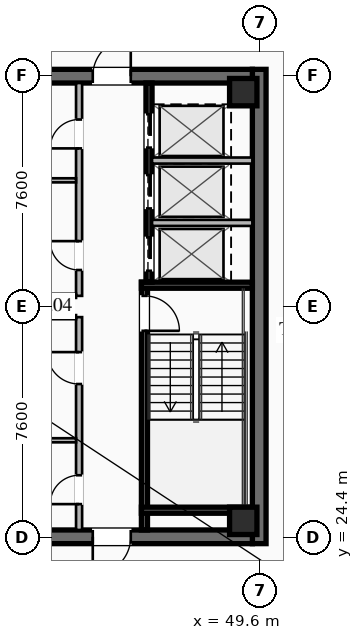
"""IFC4 building model, lengths in metres.
Left out: names, types, materials, properties, quantities, classifications, styles, units other than length and angle.
Written with IfcOpenShell. Run it as: python <this file> out.ifc"""

import sys

from ifc_helpers import new_model, si_unit, direction, frame, frame_2d, origin, origin_2d, place, context, subcontext, project, spatial, rectangle, hollow_rectangle, extrude, element, fill, save


model = new_model("IFC4")
c1 = context("Model", 3, precision=1e-05, world=origin(), true_north=direction((0.0, 1.0)))
c2 = subcontext(c1, "Body", "Model", "MODEL_VIEW")
j1 = project(units=[si_unit("LENGTHUNIT", "METRE"), si_unit("PLANEANGLEUNIT", "RADIAN")], contexts=[c1])
p1 = place(None, origin())
s1 = spatial("IfcSite", under=j1, at=p1, CompositionType="ELEMENT")
p2 = place(p1, origin())
s2 = spatial("IfcBuilding", under=s1, at=p2, CompositionType="ELEMENT")
p3 = place(p2, frame((0.0, 0.0, 255.4)))
s3 = spatial("IfcBuildingStorey", under=s2, at=p3, CompositionType="ELEMENT", Elevation=255.4)
p4 = place(p3, frame((49.575, 39.8, 0.0), z_axis=(0.0, 0.0, 1.0), x_axis=(0.0, -1.0, 0.0)))
e1 = element("IfcWall", 1, at=p4, inside=s3, PredefinedType="SHEAR", context=c2, shape_type="SweptSolid", body=[
    extrude(rectangle(XDim=15.6, YDim=0.45, at=frame_2d((7.8, 0.0))), origin(), (0.0, 0.0, 1.0), 4.0),
])
p5 = place(p3, frame((49.35, 24.425, 0.0), z_axis=(0.0, 0.0, 1.0), x_axis=(-1.0, 0.0, 0.0)))
e2 = element("IfcWall", 2, at=p5, inside=s3, PredefinedType="SHEAR", context=c2, shape_type="SweptSolid", body=[
    extrude(rectangle(XDim=14.7, YDim=0.45, at=frame_2d((7.35, 0.0))), origin(), (0.0, 0.0, 1.0), 4.0),
])
p6 = place(p5, frame((9.05, 0.0, 0.0)))
e3 = element("IfcOpeningElement", 3, at=p6, cuts=e2, PredefinedType="OPENING", context=c2, shape_type="SweptSolid", body=[
    extrude(rectangle(XDim=1.25, YDim=2.25, at=frame_2d((0.625, 1.125))), frame((0.0, 0.235, 0.0), z_axis=(0.0, -1.0, 0.0), x_axis=(1.0, 0.0, 0.0)), (0.0, 0.0, 1.0), 0.47),
])
p7 = place(p5, frame((4.0, 0.0, 0.0)))
e4 = element("IfcOpeningElement", 4, at=p7, cuts=e2, PredefinedType="OPENING", context=c2, shape_type="SweptSolid", body=[
    extrude(rectangle(XDim=1.25, YDim=2.25, at=frame_2d((0.625, 1.125))), frame((0.0, 0.235, 0.0), z_axis=(0.0, -1.0, 0.0), x_axis=(1.0, 0.0, 0.0)), (0.0, 0.0, 1.0), 0.47),
])
p8 = place(p3, frame((34.65, 39.575, 0.0), z_axis=(0.0, 0.0, 1.0), x_axis=(1.0, 0.0, 0.0)))
e5 = element("IfcWall", 5, at=p8, inside=s3, PredefinedType="SHEAR", context=c2, shape_type="SweptSolid", body=[
    extrude(rectangle(XDim=14.7, YDim=0.45, at=frame_2d((7.35, 0.0))), origin(), (0.0, 0.0, 1.0), 4.0),
])
p9 = place(p8, frame((4.4, 0.0, 0.0)))
e6 = element("IfcOpeningElement", 6, at=p9, cuts=e5, PredefinedType="OPENING", context=c2, shape_type="SweptSolid", body=[
    extrude(rectangle(XDim=1.25, YDim=2.25, at=frame_2d((0.625, 1.125))), frame((0.0, 0.235, 0.0), z_axis=(0.0, -1.0, 0.0), x_axis=(1.0, 0.0, 0.0)), (0.0, 0.0, 1.0), 0.47),
])
p10 = place(p8, frame((9.45, 0.0, 0.0)))
e7 = element("IfcOpeningElement", 7, at=p10, cuts=e5, PredefinedType="OPENING", context=c2, shape_type="SweptSolid", body=[
    extrude(rectangle(XDim=1.25, YDim=2.25, at=frame_2d((0.625, 1.125))), frame((0.0, 0.235, 0.0), z_axis=(0.0, -1.0, 0.0), x_axis=(1.0, 0.0, 0.0)), (0.0, 0.0, 1.0), 0.47),
])
for number, where, z_axis, x_axis in (
    (8, (49.05, 24.95, 0.0), (0.0, 0.0, 1.0), (1.0, 0.0, 0.0)),
    (9, (49.05, 39.05, 0.0), (0.0, 0.0, 1.0), (1.0, 0.0, 0.0)),
):
    element("IfcColumn", number, at=place(p3, frame(where, z_axis=z_axis, x_axis=x_axis)), inside=s3, PredefinedType="COLUMN", context=c2, shape_type="SweptSolid", body=[
        extrude(hollow_rectangle(XDim=0.9, YDim=0.9, WallThickness=0.04, at=origin_2d()), origin(), (0.0, 0.0, 1.0), 3.78),
    ])
p11 = place(p3, frame((45.8, 32.8, 0.0), z_axis=(0.0, 0.0, 1.0), x_axis=(0.0, -1.0, 0.0)))
e10 = element("IfcWall", 10, at=p11, inside=s3, PredefinedType="SHEAR", context=c2, shape_type="SweptSolid", body=[
    extrude(rectangle(XDim=8.15, YDim=0.2, at=frame_2d((4.075, 0.0))), origin(), (0.0, 0.0, 1.0), 3.78),
])
p12 = place(p11, frame((0.45, 0.0, 0.0)))
e11 = element("IfcOpeningElement", 11, at=p12, cuts=e10, PredefinedType="OPENING", context=c2, shape_type="SweptSolid", body=[
    extrude(rectangle(XDim=1.15, YDim=2.2, at=frame_2d((0.575, 1.1))), frame((0.0, 0.11, 0.0), z_axis=(0.0, -1.0, 0.0), x_axis=(1.0, 0.0, 0.0)), (0.0, 0.0, 1.0), 0.22),
])
for number, where, z_axis, x_axis in (
    (12, (45.7, 32.7, 0.0), (0.0, 0.0, 1.0), (1.0, 0.0, 0.0)),
    (13, (45.7, 25.3, 0.0), (0.0, 0.0, 1.0), (1.0, 0.0, 0.0)),
):
    element("IfcWall", number, at=place(p3, frame(where, z_axis=z_axis, x_axis=x_axis)), inside=s3, PredefinedType="SHEAR", context=c2, shape_type="SweptSolid", body=[
        extrude(rectangle(XDim=3.65, YDim=0.2, at=frame_2d((1.825, 0.0))), origin(), (0.0, 0.0, 1.0), 3.78),
    ])
p13 = place(p3, frame((45.95, 39.35, 0.0), z_axis=(0.0, 0.0, 1.0), x_axis=(0.0, -1.0, 0.0)))
e14 = element("IfcWall", 14, at=p13, inside=s3, PredefinedType="SHEAR", context=c2, shape_type="SweptSolid", body=[
    extrude(rectangle(XDim=6.55, YDim=0.2, at=frame_2d((3.275, 0.0))), origin(), (0.0, 0.0, 1.0), 3.78),
])
p14 = place(p13, frame((5.075, 0.0, 0.0)))
e15 = element("IfcOpeningElement", 15, at=p14, cuts=e14, PredefinedType="OPENING", context=c2, shape_type="SweptSolid", body=[
    extrude(rectangle(XDim=1.1, YDim=2.2, at=frame_2d((0.55, 1.1))), frame((0.0, 0.11, 0.0), z_axis=(0.0, -1.0, 0.0), x_axis=(1.0, 0.0, 0.0)), (0.0, 0.0, 1.0), 0.22),
])
p15 = place(p13, frame((3.025, 0.0, 0.0)))
e16 = element("IfcOpeningElement", 16, at=p15, cuts=e14, PredefinedType="OPENING", context=c2, shape_type="SweptSolid", body=[
    extrude(rectangle(XDim=1.1, YDim=2.2, at=frame_2d((0.55, 1.1))), frame((0.0, 0.11, 0.0), z_axis=(0.0, -1.0, 0.0), x_axis=(1.0, 0.0, 0.0)), (0.0, 0.0, 1.0), 0.22),
])
p16 = place(p13, frame((1.025, 0.0, 0.0)))
e17 = element("IfcOpeningElement", 17, at=p16, cuts=e14, PredefinedType="OPENING", context=c2, shape_type="SweptSolid", body=[
    extrude(rectangle(XDim=1.1, YDim=2.2, at=frame_2d((0.55, 1.1))), frame((0.0, 0.11, 0.0), z_axis=(0.0, -1.0, 0.0), x_axis=(1.0, 0.0, 0.0)), (0.0, 0.0, 1.0), 0.22),
])
for number, where, z_axis, x_axis in (
    (18, (46.05, 34.75, 0.0), (0.0, 0.0, 1.0), (1.0, 0.0, 0.0)),
    (19, (46.05, 36.8, 0.0), (0.0, 0.0, 1.0), (1.0, 0.0, 0.0)),
):
    element("IfcWall", number, at=place(p3, frame(where, z_axis=z_axis, x_axis=x_axis)), inside=s3, PredefinedType="SOLIDWALL", context=c2, shape_type="SweptSolid", body=[
        extrude(rectangle(XDim=3.3, YDim=0.2, at=frame_2d((1.65, 0.0))), origin(), (0.0, 0.0, 1.0), 3.78),
    ])
p17 = place(p3, frame((43.65, 24.65, 0.0), z_axis=(0.0, 0.0, 1.0), x_axis=(0.0, 1.0, 0.0)))
e20 = element("IfcWall", 20, at=p17, inside=s3, PredefinedType="SOLIDWALL", context=c2, shape_type="SweptSolid", body=[
    extrude(rectangle(XDim=7.0, YDim=0.2, at=frame_2d((3.5, 0.0))), origin(), (0.0, 0.0, 1.0), 2.971),
])
p18 = place(p17, frame((0.85, 0.0, 0.0)))
e21 = element("IfcOpeningElement", 21, at=p18, cuts=e20, PredefinedType="OPENING", context=c2, shape_type="SweptSolid", body=[
    extrude(rectangle(XDim=0.95, YDim=2.05, at=frame_2d((0.475, 1.025))), frame((0.0, 0.11, 0.0), z_axis=(0.0, -1.0, 0.0), x_axis=(1.0, 0.0, 0.0)), (0.0, 0.0, 1.0), 0.22),
])
p19 = place(p17, frame((4.8, 0.0, 0.0)))
e22 = element("IfcOpeningElement", 22, at=p19, cuts=e20, PredefinedType="OPENING", context=c2, shape_type="SweptSolid", body=[
    extrude(rectangle(XDim=1.05, YDim=2.2, at=frame_2d((0.525, 1.1))), frame((0.0, 0.11, 0.0), z_axis=(0.0, -1.0, 0.0), x_axis=(1.0, 0.0, 0.0)), (0.0, 0.0, 1.0), 0.22),
])
for number, where, z_axis, x_axis in (
    (23, (41.67, 31.65, 0.0), (0.0, 0.0, 1.0), (1.0, 0.0, 0.0)),
    (24, (41.67, 27.6, 0.0), (0.0, 0.0, 1.0), (1.0, 0.0, 0.0)),
):
    element("IfcWall", number, at=place(p3, frame(where, z_axis=z_axis, x_axis=x_axis)), inside=s3, PredefinedType="PARTITIONING", context=c2, shape_type="SweptSolid", body=[
        extrude(rectangle(XDim=1.88, YDim=0.135, at=frame_2d((0.94, 0.0))), origin(), (0.0, 0.0, 1.0), 2.971),
    ])
p20 = place(p3, frame((43.65, 32.35, 0.0), z_axis=(0.0, 0.0, 1.0), x_axis=(0.0, 1.0, 0.0)))
e25 = element("IfcWall", 25, at=p20, inside=s3, PredefinedType="SOLIDWALL", context=c2, shape_type="SweptSolid", body=[
    extrude(rectangle(XDim=7.0, YDim=0.2, at=frame_2d((3.5, 0.0))), origin(), (0.0, 0.0, 1.0), 2.971),
])
p21 = place(p20, frame((0.85, 0.0, 0.0)))
e26 = element("IfcOpeningElement", 26, at=p21, cuts=e25, PredefinedType="OPENING", context=c2, shape_type="SweptSolid", body=[
    extrude(rectangle(XDim=0.95, YDim=2.05, at=frame_2d((0.475, 1.025))), frame((0.0, 0.11, 0.0), z_axis=(0.0, -1.0, 0.0), x_axis=(1.0, 0.0, 0.0)), (0.0, 0.0, 1.0), 0.22),
])
p22 = place(p20, frame((4.85, 0.0, 0.0)))
e27 = element("IfcOpeningElement", 27, at=p22, cuts=e25, PredefinedType="OPENING", context=c2, shape_type="SweptSolid", body=[
    extrude(rectangle(XDim=0.95, YDim=2.05, at=frame_2d((0.475, 1.025))), frame((0.0, 0.11, 0.0), z_axis=(0.0, -1.0, 0.0), x_axis=(1.0, 0.0, 0.0)), (0.0, 0.0, 1.0), 0.22),
])
for number, where, z_axis, x_axis in (
    (28, (41.67, 32.35, 0.0), (0.0, 0.0, 1.0), (1.0, 0.0, 0.0)),
    (29, (41.67, 36.15, 0.0), (0.0, 0.0, 1.0), (1.0, 0.0, 0.0)),
):
    element("IfcWall", number, at=place(p3, frame(where, z_axis=z_axis, x_axis=x_axis)), inside=s3, PredefinedType="PARTITIONING", context=c2, shape_type="SweptSolid", body=[
        extrude(rectangle(XDim=1.88, YDim=0.135, at=frame_2d((0.94, 0.0))), origin(), (0.0, 0.0, 1.0), 2.971),
    ])
p23 = place(p10, origin())
e30 = element("IfcDoor", 30, at=p23, inside=s3, OperationType="SINGLE_SWING_RIGHT", PredefinedType="DOOR", context=c2, shape_type="SweptSolid", body=[
    extrude(rectangle(XDim=1.25, YDim=2.25, at=frame_2d((0.625, 1.125))), frame((0.0, 0.025, 0.0), z_axis=(0.0, -1.0, 0.0), x_axis=(1.0, 0.0, 0.0)), (0.0, 0.0, 1.0), 0.05),
])
fill(e7, e30)
p24 = place(p7, origin())
e31 = element("IfcDoor", 31, at=p24, inside=s3, OperationType="SINGLE_SWING_RIGHT", PredefinedType="DOOR", context=c2, shape_type="SweptSolid", body=[
    extrude(rectangle(XDim=1.25, YDim=2.25, at=frame_2d((0.625, 1.125))), frame((0.0, 0.025, 0.0), z_axis=(0.0, -1.0, 0.0), x_axis=(1.0, 0.0, 0.0)), (0.0, 0.0, 1.0), 0.05),
])
fill(e4, e31)
p25 = place(p12, origin())
e32 = element("IfcDoor", 32, at=p25, inside=s3, OperationType="SINGLE_SWING_RIGHT", PredefinedType="DOOR", context=c2, shape_type="SweptSolid", body=[
    extrude(rectangle(XDim=1.15, YDim=2.2, at=frame_2d((0.575, 1.1))), frame((0.0, 0.025, 0.0), z_axis=(0.0, -1.0, 0.0), x_axis=(1.0, 0.0, 0.0)), (0.0, 0.0, 1.0), 0.05),
])
fill(e11, e32)
p26 = place(p18, origin())
e33 = element("IfcDoor", 33, at=p26, inside=s3, OperationType="SINGLE_SWING_LEFT", PredefinedType="DOOR", context=c2, shape_type="SweptSolid", body=[
    extrude(rectangle(XDim=0.95, YDim=2.05, at=frame_2d((0.475, 1.025))), frame((0.0, 0.025, 0.0), z_axis=(0.0, -1.0, 0.0), x_axis=(1.0, 0.0, 0.0)), (0.0, 0.0, 1.0), 0.05),
])
fill(e21, e33)
p27 = place(p19, origin())
e34 = element("IfcDoor", 34, at=p27, inside=s3, OperationType="SINGLE_SWING_RIGHT", PredefinedType="DOOR", context=c2, shape_type="SweptSolid", body=[
    extrude(rectangle(XDim=1.05, YDim=2.2, at=frame_2d((0.525, 1.1))), frame((0.0, 0.025, 0.0), z_axis=(0.0, -1.0, 0.0), x_axis=(1.0, 0.0, 0.0)), (0.0, 0.0, 1.0), 0.05),
])
fill(e22, e34)
p28 = place(p21, origin())
e35 = element("IfcDoor", 35, at=p28, inside=s3, OperationType="SINGLE_SWING_RIGHT", PredefinedType="DOOR", context=c2, shape_type="SweptSolid", body=[
    extrude(rectangle(XDim=0.95, YDim=2.05, at=frame_2d((0.475, 1.025))), frame((0.0, 0.025, 0.0), z_axis=(0.0, -1.0, 0.0), x_axis=(1.0, 0.0, 0.0)), (0.0, 0.0, 1.0), 0.05),
])
fill(e26, e35)
p29 = place(p22, origin())
e36 = element("IfcDoor", 36, at=p29, inside=s3, OperationType="SINGLE_SWING_LEFT", PredefinedType="DOOR", context=c2, shape_type="SweptSolid", body=[
    extrude(rectangle(XDim=0.95, YDim=2.05, at=frame_2d((0.475, 1.025))), frame((0.0, 0.025, 0.0), z_axis=(0.0, -1.0, 0.0), x_axis=(1.0, 0.0, 0.0)), (0.0, 0.0, 1.0), 0.05),
])
fill(e27, e36)
p30 = place(p14, origin())
e37 = element("IfcDoor", 37, at=p30, inside=s3, OperationType="SLIDING_TO_LEFT", PredefinedType="DOOR", context=c2, shape_type="SweptSolid", body=[
    extrude(rectangle(XDim=1.1, YDim=2.2, at=frame_2d((0.55, 1.1))), frame((0.0, 0.025, 0.0), z_axis=(0.0, -1.0, 0.0), x_axis=(1.0, 0.0, 0.0)), (0.0, 0.0, 1.0), 0.05),
])
fill(e15, e37)
p31 = place(p15, origin())
e38 = element("IfcDoor", 38, at=p31, inside=s3, OperationType="SLIDING_TO_LEFT", PredefinedType="DOOR", context=c2, shape_type="SweptSolid", body=[
    extrude(rectangle(XDim=1.1, YDim=2.2, at=frame_2d((0.55, 1.1))), frame((0.0, 0.025, 0.0), z_axis=(0.0, -1.0, 0.0), x_axis=(1.0, 0.0, 0.0)), (0.0, 0.0, 1.0), 0.05),
])
fill(e16, e38)
p32 = place(p16, origin())
e39 = element("IfcDoor", 39, at=p32, inside=s3, OperationType="SLIDING_TO_LEFT", PredefinedType="DOOR", context=c2, shape_type="SweptSolid", body=[
    extrude(rectangle(XDim=1.1, YDim=2.2, at=frame_2d((0.55, 1.1))), frame((0.0, 0.025, 0.0), z_axis=(0.0, -1.0, 0.0), x_axis=(1.0, 0.0, 0.0)), (0.0, 0.0, 1.0), 0.05),
])
fill(e17, e39)
save(model, sys.argv[1])
